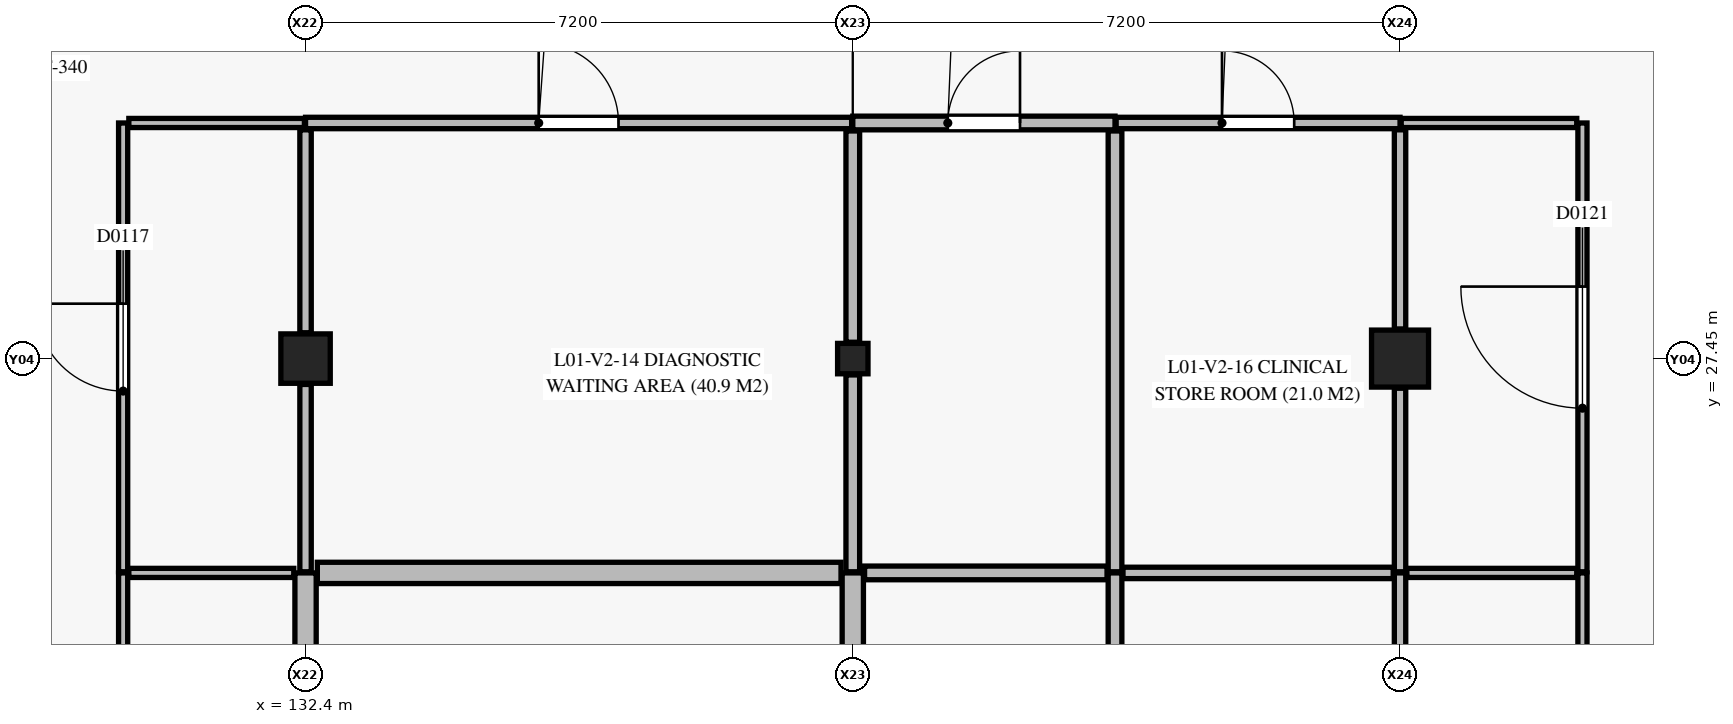
"""IFC4 building model, lengths in metres.
Left out: names, types, materials, properties, quantities, classifications, styles, units other than length and angle.
Written with IfcOpenShell. Run it as: python <this file> out.ifc"""

import sys

from ifc_helpers import new_model, si_unit, direction, frame, frame_2d, origin, origin_2d, place, context, subcontext, project, spatial, rectangle, extrude, element, fill, save


model = new_model("IFC4")
c1 = context("Model", 3, precision=1e-05, world=origin(), true_north=direction((0.0, 1.0)))
c2 = subcontext(c1, "Body", "Model", "MODEL_VIEW")
j1 = project(units=[si_unit("LENGTHUNIT", "METRE"), si_unit("PLANEANGLEUNIT", "RADIAN")], contexts=[c1])
p1 = place(None, origin())
s1 = spatial("IfcSite", under=j1, at=p1, CompositionType="ELEMENT")
p2 = place(p1, origin())
s2 = spatial("IfcBuilding", under=s1, at=p2, CompositionType="ELEMENT")
p3 = place(p2, frame((0.0, 0.0, 4.8)))
s3 = spatial("IfcBuildingStorey", under=s2, at=p3, CompositionType="ELEMENT", Elevation=4.8)
p4 = place(p3, frame((132.4, 27.45, 0.0), z_axis=(0.0, 0.0, 1.0), x_axis=(1.0, 0.0, 0.0)))
e1 = element("IfcColumn", 1, at=p4, inside=s3, PredefinedType="COLUMN", context=c2, shape_type="SweptSolid", body=[
    extrude(rectangle(XDim=0.65, YDim=0.65, at=origin_2d()), origin(), (0.0, 0.0, 1.0), 4.05),
])
p5 = place(p3, frame((139.6, 27.45, 0.0), z_axis=(0.0, 0.0, 1.0), x_axis=(1.0, 0.0, 0.0)))
e2 = element("IfcColumn", 2, at=p5, inside=s3, PredefinedType="COLUMN", context=c2, shape_type="SweptSolid", body=[
    extrude(rectangle(XDim=0.4, YDim=0.4, at=origin_2d()), origin(), (0.0, 0.0, 1.0), 4.05),
])
p6 = place(p3, frame((146.8, 27.45, 0.0), z_axis=(0.0, 0.0, 1.0), x_axis=(1.0, 0.0, 0.0)))
e3 = element("IfcColumn", 3, at=p6, inside=s3, PredefinedType="COLUMN", context=c2, shape_type="SweptSolid", body=[
    extrude(rectangle(XDim=0.75, YDim=0.75, at=origin_2d()), origin(), (0.0, 0.0, 1.0), 4.05),
])
p7 = place(p3, frame((139.6, 30.55, 0.0), z_axis=(0.0, 0.0, 1.0), x_axis=(1.0, 0.0, 0.0)))
e4 = element("IfcWall", 4, at=p7, inside=s3, PredefinedType="PLUMBINGWALL", context=c2, shape_type="SweptSolid", body=[
    extrude(rectangle(XDim=3.45, YDim=0.18, at=frame_2d((1.725, 0.0))), origin(), (0.0, 0.0, 1.0), 3.95),
])
p8 = place(p7, frame((1.25, 0.0, 0.0)))
e5 = element("IfcOpeningElement", 5, at=p8, cuts=e4, PredefinedType="OPENING", context=c2, shape_type="SweptSolid", body=[
    extrude(rectangle(XDim=0.95, YDim=2.1, at=frame_2d((0.475, 1.05))), frame((0.0, 0.1, 0.0), z_axis=(0.0, -1.0, 0.0), x_axis=(1.0, 0.0, 0.0)), (0.0, 0.0, 1.0), 0.2),
])
p9 = place(p3, frame((132.4, 30.55, 0.0), z_axis=(0.0, 0.0, 1.0), x_axis=(1.0, 0.0, 0.0)))
e6 = element("IfcWall", 6, at=p9, inside=s3, PredefinedType="PARTITIONING", context=c2, shape_type="SweptSolid", body=[
    extrude(rectangle(XDim=7.185, YDim=0.15, at=frame_2d((3.593, 0.0))), origin(), (0.0, 0.0, 1.0), 3.95),
])
p10 = place(p9, frame((3.067, 0.0, 0.0)))
e7 = element("IfcOpeningElement", 7, at=p10, cuts=e6, PredefinedType="OPENING", context=c2, shape_type="SweptSolid", body=[
    extrude(rectangle(XDim=1.05, YDim=2.15, at=frame_2d((0.525, 1.075))), frame((0.0, 0.085, 0.0), z_axis=(0.0, -1.0, 0.0), x_axis=(1.0, 0.0, 0.0)), (0.0, 0.0, 1.0), 0.17),
])
p11 = place(p3, frame((143.065, 30.55, 0.0), z_axis=(0.0, 0.0, 1.0), x_axis=(1.0, 0.0, 0.0)))
e8 = element("IfcWall", 8, at=p11, inside=s3, PredefinedType="PARTITIONING", context=c2, shape_type="SweptSolid", body=[
    extrude(rectangle(XDim=3.735, YDim=0.15, at=frame_2d((1.868, 0.0))), origin(), (0.0, 0.0, 1.0), 3.95),
])
p12 = place(p11, frame((1.393, 0.0, 0.0)))
e9 = element("IfcOpeningElement", 9, at=p12, cuts=e8, PredefinedType="OPENING", context=c2, shape_type="SweptSolid", body=[
    extrude(rectangle(XDim=0.95, YDim=2.1, at=frame_2d((0.475, 1.05))), frame((0.0, 0.085, 0.0), z_axis=(0.0, -1.0, 0.0), x_axis=(1.0, 0.0, 0.0)), (0.0, 0.0, 1.0), 0.17),
])
p13 = place(p3, frame((130.0, 18.085, 0.0), z_axis=(0.0, 0.0, 1.0), x_axis=(0.0, 1.0, 0.0)))
e10 = element("IfcWall", 10, at=p13, inside=s3, PredefinedType="PARTITIONING", context=c2, shape_type="SweptSolid", body=[
    extrude(rectangle(XDim=6.545, YDim=0.12, at=frame_2d((3.272, 0.0))), origin(), (0.0, 0.0, 1.0), 3.54),
])
p14 = place(p13, frame((2.472, 0.0, 0.0)))
e11 = element("IfcOpeningElement", 11, at=p14, cuts=e10, PredefinedType="OPENING", context=c2, shape_type="SweptSolid", body=[
    extrude(rectangle(XDim=1.6, YDim=2.25, at=frame_2d((0.8, 1.125))), frame((0.0, 0.07, 0.0), z_axis=(0.0, -1.0, 0.0), x_axis=(1.0, 0.0, 0.0)), (0.0, 0.0, 1.0), 0.14),
])
p15 = place(p3, frame((149.2, 18.01, 0.0), z_axis=(0.0, 0.0, 1.0), x_axis=(0.0, 1.0, 0.0)))
e12 = element("IfcWall", 12, at=p15, inside=s3, PredefinedType="PARTITIONING", context=c2, shape_type="SweptSolid", body=[
    extrude(rectangle(XDim=6.62, YDim=0.12, at=frame_2d((3.31, 0.0))), origin(), (0.0, 0.0, 1.0), 3.37),
])
p16 = place(p15, frame((2.81, 0.0, 0.0)))
e13 = element("IfcOpeningElement", 13, at=p16, cuts=e12, PredefinedType="OPENING", context=c2, shape_type="SweptSolid", body=[
    extrude(rectangle(XDim=1.0, YDim=2.15, at=frame_2d((0.5, 1.075))), frame((0.0, 0.07, 0.0), z_axis=(0.0, -1.0, 0.0), x_axis=(1.0, 0.0, 0.0)), (0.0, 0.0, 1.0), 0.14),
])
p17 = place(p3, frame((130.0, 24.645, 0.0), z_axis=(0.0, 0.0, 1.0), x_axis=(0.0, 1.0, 0.0)))
e14 = element("IfcWall", 14, at=p17, inside=s3, PredefinedType="PARTITIONING", context=c2, shape_type="SweptSolid", body=[
    extrude(rectangle(XDim=5.905, YDim=0.12, at=frame_2d((2.953, 0.0))), origin(), (0.0, 0.0, 1.0), 3.44),
])
p18 = place(p17, frame((2.377, 0.0, 0.0)))
e15 = element("IfcOpeningElement", 15, at=p18, cuts=e14, PredefinedType="OPENING", context=c2, shape_type="SweptSolid", body=[
    extrude(rectangle(XDim=1.15, YDim=2.15, at=frame_2d((0.575, 1.075))), frame((0.0, 0.07, 0.0), z_axis=(0.0, -1.0, 0.0), x_axis=(1.0, 0.0, 0.0)), (0.0, 0.0, 1.0), 0.14),
])
p19 = place(p3, frame((130.075, 30.55, 0.0), z_axis=(0.0, 0.0, 1.0), x_axis=(1.0, 0.0, 0.0)))
e16 = element("IfcWall", 16, at=p19, inside=s3, PredefinedType="PARTITIONING", context=c2, shape_type="SweptSolid", body=[
    extrude(rectangle(XDim=2.31, YDim=0.12, at=frame_2d((1.155, 0.0))), origin(), (0.0, 0.0, 1.0), 3.95),
])
p20 = place(p3, frame((149.2, 24.645, 0.0), z_axis=(0.0, 0.0, 1.0), x_axis=(0.0, 1.0, 0.0)))
e17 = element("IfcWall", 17, at=p20, inside=s3, PredefinedType="PARTITIONING", context=c2, shape_type="SweptSolid", body=[
    extrude(rectangle(XDim=5.905, YDim=0.12, at=frame_2d((2.953, 0.0))), origin(), (0.0, 0.0, 1.0), 3.22),
])
p21 = place(p20, frame((2.153, 0.0, 0.0)))
e18 = element("IfcOpeningElement", 18, at=p21, cuts=e17, PredefinedType="OPENING", context=c2, shape_type="SweptSolid", body=[
    extrude(rectangle(XDim=1.6, YDim=2.25, at=frame_2d((0.8, 1.125))), frame((0.0, 0.07, 0.0), z_axis=(0.0, -1.0, 0.0), x_axis=(1.0, 0.0, 0.0)), (0.0, 0.0, 1.0), 0.14),
])
p22 = place(p3, frame((146.815, 30.55, 0.0), z_axis=(0.0, 0.0, 1.0), x_axis=(1.0, 0.0, 0.0)))
e19 = element("IfcWall", 19, at=p22, inside=s3, PredefinedType="PARTITIONING", context=c2, shape_type="SweptSolid", body=[
    extrude(rectangle(XDim=2.31, YDim=0.12, at=frame_2d((1.155, 0.0))), origin(), (0.0, 0.0, 1.0), 3.95),
])
p23 = place(p3, frame((132.4, 20.615, 0.0), z_axis=(0.0, 0.0, 1.0), x_axis=(0.0, 1.0, 0.0)))
e20 = element("IfcWall", 20, at=p23, inside=s3, PredefinedType="PARTITIONING", context=c2, shape_type="SweptSolid", body=[
    extrude(rectangle(XDim=4.015, YDim=0.28, at=frame_2d((2.007, 0.0))), origin(), (0.0, 0.0, 1.0), 3.95),
])
p24 = place(p3, frame((139.6, 20.49, 0.0), z_axis=(0.0, 0.0, 1.0), x_axis=(0.0, 1.0, 0.0)))
e21 = element("IfcWall", 21, at=p24, inside=s3, PredefinedType="PARTITIONING", context=c2, shape_type="SweptSolid", body=[
    extrude(rectangle(XDim=4.14, YDim=0.28, at=frame_2d((2.07, 0.0))), origin(), (0.0, 0.0, 1.0), 3.95),
])
p25 = place(p3, frame((132.555, 24.63, 0.0), z_axis=(0.0, 0.0, 1.0), x_axis=(1.0, 0.0, 0.0)))
e22 = element("IfcWall", 22, at=p25, inside=s3, PredefinedType="PARTITIONING", context=c2, shape_type="SweptSolid", body=[
    extrude(rectangle(XDim=6.89, YDim=0.28, at=frame_2d((3.445, 0.0))), origin(), (0.0, 0.0, 1.0), 3.95),
])
p26 = place(p3, frame((143.05, 18.115, 0.0), z_axis=(0.0, 0.0, 1.0), x_axis=(0.0, 1.0, 0.0)))
e23 = element("IfcWall", 23, at=p26, inside=s3, PredefinedType="PLUMBINGWALL", context=c2, shape_type="SweptSolid", body=[
    extrude(rectangle(XDim=6.515, YDim=0.18, at=frame_2d((3.257, 0.0))), origin(), (0.0, 0.0, 1.0), 3.37),
])
p27 = place(p3, frame((139.755, 24.63, 0.0), z_axis=(0.0, 0.0, 1.0), x_axis=(1.0, 0.0, 0.0)))
e24 = element("IfcWall", 24, at=p27, inside=s3, PredefinedType="PLUMBINGWALL", context=c2, shape_type="SweptSolid", body=[
    extrude(rectangle(XDim=3.19, YDim=0.18, at=frame_2d((1.595, 0.0))), origin(), (0.0, 0.0, 1.0), 3.95),
])
p28 = place(p3, frame((139.6, 24.645, 0.0), z_axis=(0.0, 0.0, 1.0), x_axis=(0.0, 1.0, 0.0)))
e25 = element("IfcWall", 25, at=p28, inside=s3, PredefinedType="PLUMBINGWALL", context=c2, shape_type="SweptSolid", body=[
    extrude(rectangle(XDim=2.59, YDim=0.18, at=frame_2d((1.295, 0.0))), origin(), (0.0, 0.0, 1.0), 3.95),
])
p29 = place(p3, frame((139.6, 27.665, 0.0), z_axis=(0.0, 0.0, 1.0), x_axis=(0.0, 1.0, 0.0)))
e26 = element("IfcWall", 26, at=p29, inside=s3, PredefinedType="PLUMBINGWALL", context=c2, shape_type="SweptSolid", body=[
    extrude(rectangle(XDim=2.78, YDim=0.18, at=frame_2d((1.39, 0.0))), origin(), (0.0, 0.0, 1.0), 3.95),
])
p30 = place(p3, frame((143.05, 24.645, 0.0), z_axis=(0.0, 0.0, 1.0), x_axis=(0.0, 1.0, 0.0)))
e27 = element("IfcWall", 27, at=p30, inside=s3, PredefinedType="PLUMBINGWALL", context=c2, shape_type="SweptSolid", body=[
    extrude(rectangle(XDim=5.8, YDim=0.18, at=frame_2d((2.9, 0.0))), origin(), (0.0, 0.0, 1.0), 3.47),
])
p31 = place(p3, frame((146.8, 20.54, 0.0), z_axis=(0.0, 0.0, 1.0), x_axis=(0.0, 1.0, 0.0)))
e28 = element("IfcWall", 28, at=p31, inside=s3, PredefinedType="PARTITIONING", context=c2, shape_type="SweptSolid", body=[
    extrude(rectangle(XDim=4.09, YDim=0.15, at=frame_2d((2.045, 0.0))), origin(), (0.0, 0.0, 1.0), 3.95),
])
p32 = place(p3, frame((143.155, 24.63, 0.0), z_axis=(0.0, 0.0, 1.0), x_axis=(1.0, 0.0, 0.0)))
e29 = element("IfcWall", 29, at=p32, inside=s3, PredefinedType="PARTITIONING", context=c2, shape_type="SweptSolid", body=[
    extrude(rectangle(XDim=3.555, YDim=0.15, at=frame_2d((1.777, 0.0))), origin(), (0.0, 0.0, 1.0), 3.95),
])
p33 = place(p3, frame((132.4, 24.645, 0.0), z_axis=(0.0, 0.0, 1.0), x_axis=(0.0, 1.0, 0.0)))
e30 = element("IfcWall", 30, at=p33, inside=s3, PredefinedType="PARTITIONING", context=c2, shape_type="SweptSolid", body=[
    extrude(rectangle(XDim=2.465, YDim=0.15, at=frame_2d((1.232, 0.0))), origin(), (0.0, 0.0, 1.0), 3.95),
])
p34 = place(p3, frame((132.4, 27.79, 0.0), z_axis=(0.0, 0.0, 1.0), x_axis=(0.0, 1.0, 0.0)))
e31 = element("IfcWall", 31, at=p34, inside=s3, PredefinedType="PARTITIONING", context=c2, shape_type="SweptSolid", body=[
    extrude(rectangle(XDim=2.67, YDim=0.15, at=frame_2d((1.335, 0.0))), origin(), (0.0, 0.0, 1.0), 3.95),
])
p35 = place(p3, frame((146.8, 24.645, 0.0), z_axis=(0.0, 0.0, 1.0), x_axis=(0.0, 1.0, 0.0)))
e32 = element("IfcWall", 32, at=p35, inside=s3, PredefinedType="PARTITIONING", context=c2, shape_type="SweptSolid", body=[
    extrude(rectangle(XDim=2.415, YDim=0.15, at=frame_2d((1.208, 0.0))), origin(), (0.0, 0.0, 1.0), 3.95),
])
p36 = place(p3, frame((146.8, 27.84, 0.0), z_axis=(0.0, 0.0, 1.0), x_axis=(0.0, 1.0, 0.0)))
e33 = element("IfcWall", 33, at=p36, inside=s3, PredefinedType="PARTITIONING", context=c2, shape_type="SweptSolid", body=[
    extrude(rectangle(XDim=2.62, YDim=0.15, at=frame_2d((1.31, 0.0))), origin(), (0.0, 0.0, 1.0), 3.95),
])
p37 = place(p3, frame((130.075, 24.63, 0.0), z_axis=(0.0, 0.0, 1.0), x_axis=(1.0, 0.0, 0.0)))
e34 = element("IfcWall", 34, at=p37, inside=s3, PredefinedType="PARTITIONING", context=c2, shape_type="SweptSolid", body=[
    extrude(rectangle(XDim=2.17, YDim=0.12, at=frame_2d((1.085, 0.0))), origin(), (0.0, 0.0, 1.0), 3.95),
])
p38 = place(p3, frame((146.89, 24.63, 0.0), z_axis=(0.0, 0.0, 1.0), x_axis=(1.0, 0.0, 0.0)))
e35 = element("IfcWall", 35, at=p38, inside=s3, PredefinedType="PARTITIONING", context=c2, shape_type="SweptSolid", body=[
    extrude(rectangle(XDim=2.235, YDim=0.12, at=frame_2d((1.118, 0.0))), origin(), (0.0, 0.0, 1.0), 3.95),
])
p39 = place(p18, origin())
e36 = element("IfcDoor", 36, at=p39, inside=s3, OperationType="SINGLE_SWING_RIGHT", PredefinedType="DOOR", context=c2, shape_type="SweptSolid", body=[
    extrude(rectangle(XDim=1.15, YDim=2.15, at=frame_2d((0.575, 1.075))), frame((0.0, 0.025, 0.0), z_axis=(0.0, -1.0, 0.0), x_axis=(1.0, 0.0, 0.0)), (0.0, 0.0, 1.0), 0.05),
])
fill(e15, e36)
p40 = place(p10, origin())
e37 = element("IfcDoor", 37, at=p40, inside=s3, OperationType="SINGLE_SWING_LEFT", PredefinedType="DOOR", context=c2, shape_type="SweptSolid", body=[
    extrude(rectangle(XDim=1.05, YDim=2.15, at=frame_2d((0.525, 1.075))), frame((0.0, 0.025, 0.0), z_axis=(0.0, -1.0, 0.0), x_axis=(1.0, 0.0, 0.0)), (0.0, 0.0, 1.0), 0.05),
])
fill(e7, e37)
p41 = place(p8, origin())
e38 = element("IfcDoor", 38, at=p41, inside=s3, OperationType="SINGLE_SWING_RIGHT", PredefinedType="DOOR", context=c2, shape_type="SweptSolid", body=[
    extrude(rectangle(XDim=0.95, YDim=2.1, at=frame_2d((0.475, 1.05))), frame((0.0, 0.025, 0.0), z_axis=(0.0, -1.0, 0.0), x_axis=(1.0, 0.0, 0.0)), (0.0, 0.0, 1.0), 0.05),
])
fill(e5, e38)
p42 = place(p12, origin())
e39 = element("IfcDoor", 39, at=p42, inside=s3, OperationType="SINGLE_SWING_LEFT", PredefinedType="DOOR", context=c2, shape_type="SweptSolid", body=[
    extrude(rectangle(XDim=0.95, YDim=2.1, at=frame_2d((0.475, 1.05))), frame((0.0, 0.025, 0.0), z_axis=(0.0, -1.0, 0.0), x_axis=(1.0, 0.0, 0.0)), (0.0, 0.0, 1.0), 0.05),
])
fill(e9, e39)
p43 = place(p21, origin())
e40 = element("IfcDoor", 40, at=p43, inside=s3, OperationType="SINGLE_SWING_RIGHT", PredefinedType="DOOR", context=c2, shape_type="SweptSolid", body=[
    extrude(rectangle(XDim=1.6, YDim=2.25, at=frame_2d((0.8, 1.125))), frame((0.0, 0.025, 0.0), z_axis=(0.0, -1.0, 0.0), x_axis=(1.0, 0.0, 0.0)), (0.0, 0.0, 1.0), 0.05),
])
fill(e18, e40)
save(model, sys.argv[1])
